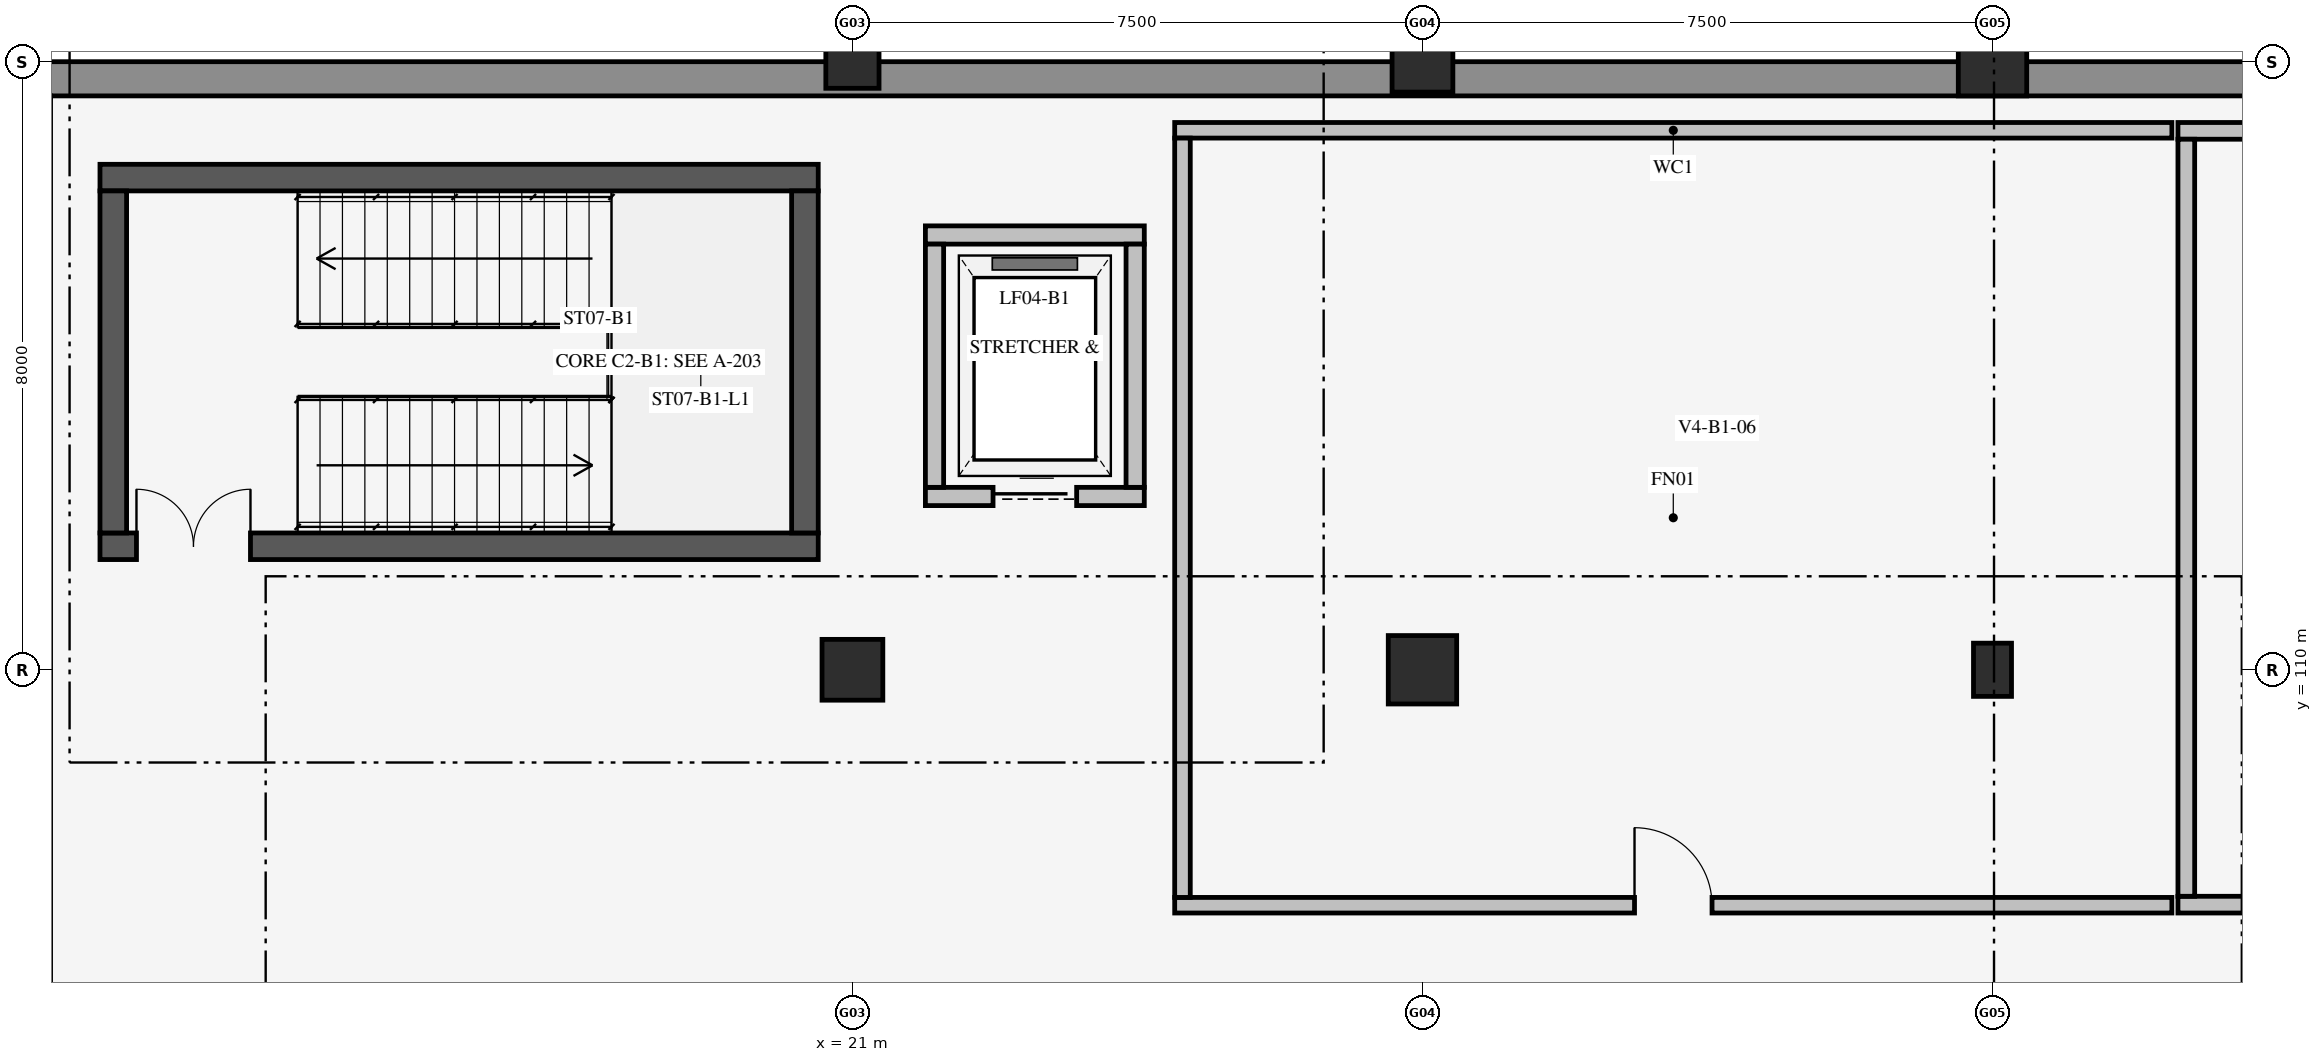
"""IFC4 building model, lengths in metres.
Left out: names, types, materials, properties, quantities, classifications, styles, units other than length and angle.
Written with IfcOpenShell. Run it as: python <this file> out.ifc"""

import sys

from ifc_helpers import new_model, si_unit, direction, frame, frame_2d, origin, origin_2d, place, context, subcontext, project, spatial, rectangle, extrude, element, fill, save


model = new_model("IFC4")
c1 = context("Model", 3, precision=1e-05, world=origin(), true_north=direction((0.0, 1.0)))
c2 = subcontext(c1, "Body", "Model", "MODEL_VIEW")
j1 = project(units=[si_unit("LENGTHUNIT", "METRE"), si_unit("PLANEANGLEUNIT", "RADIAN")], contexts=[c1])
p1 = place(None, origin())
s1 = spatial("IfcSite", under=j1, at=p1, CompositionType="ELEMENT")
p2 = place(p1, origin())
s2 = spatial("IfcBuilding", under=s1, at=p2, CompositionType="ELEMENT")
p3 = place(p2, frame((0.0, 0.0, -5.2)))
s3 = spatial("IfcBuildingStorey", under=s2, at=p3, CompositionType="ELEMENT", Elevation=-5.2)
p4 = place(p3, frame((10.0, 117.775, 0.0), z_axis=(0.0, 0.0, 1.0), x_axis=(1.0, 0.0, 0.0)))
e1 = element("IfcWall", 1, at=p4, inside=s3, PredefinedType="USERDEFINED", context=c2, shape_type="SweptSolid", body=[
    extrude(rectangle(XDim=79.0, YDim=0.45, at=frame_2d((39.5, 0.0))), origin(), (0.0, 0.0, 1.0), 4.94),
])
p5 = place(p3, frame((11.1, 111.625, 0.0), z_axis=(0.0, 0.0, 1.0), x_axis=(1.0, 0.0, 0.0)))
e2 = element("IfcWall", 2, at=p5, inside=s3, PredefinedType="SHEAR", context=c2, shape_type="SweptSolid", body=[
    extrude(rectangle(XDim=9.45, YDim=0.35, at=frame_2d((4.725, 0.0))), origin(), (0.0, 0.0, 1.0), 4.94),
])
p6 = place(p5, frame((0.48, 0.0, 0.0)))
e3 = element("IfcOpeningElement", 3, at=p6, cuts=e2, PredefinedType="OPENING", context=c2, shape_type="SweptSolid", body=[
    extrude(rectangle(XDim=1.5, YDim=2.3, at=frame_2d((0.75, 1.15))), frame((0.0, 0.187, 0.0), z_axis=(0.0, -1.0, 0.0), x_axis=(1.0, 0.0, 0.0)), (0.0, 0.0, 1.0), 0.374),
])
p7 = place(p3, frame((11.1, 116.475, 0.0), z_axis=(0.0, 0.0, 1.0), x_axis=(1.0, 0.0, 0.0)))
e4 = element("IfcWall", 4, at=p7, inside=s3, PredefinedType="SHEAR", context=c2, shape_type="SweptSolid", body=[
    extrude(rectangle(XDim=9.45, YDim=0.35, at=frame_2d((4.725, 0.0))), origin(), (0.0, 0.0, 1.0), 4.94),
])
for number, where, z_axis, x_axis in (
    (5, (11.275, 111.8, 0.0), (0.0, 0.0, 1.0), (0.0, 1.0, 0.0)),
    (6, (20.375, 111.8, 0.0), (0.0, 0.0, 1.0), (0.0, 1.0, 0.0)),
):
    element("IfcWall", number, at=place(p3, frame(where, z_axis=z_axis, x_axis=x_axis)), inside=s3, PredefinedType="SHEAR", context=c2, shape_type="SweptSolid", body=[
        extrude(rectangle(XDim=4.5, YDim=0.35, at=frame_2d((2.25, 0.0))), origin(), (0.0, 0.0, 1.0), 4.94),
    ])
p8 = place(p3, frame((21.96, 112.28, 0.0), z_axis=(0.0, 0.0, 1.0), x_axis=(1.0, 0.0, 0.0)))
e7 = element("IfcWall", 7, at=p8, inside=s3, PredefinedType="SOLIDWALL", context=c2, shape_type="SweptSolid", body=[
    extrude(rectangle(XDim=2.88, YDim=0.24, at=frame_2d((1.44, 0.0))), origin(), (0.0, 0.0, 1.0), 5.2),
])
p9 = place(p8, frame((0.89, 0.0, 0.0)))
e8 = element("IfcOpeningElement", 8, at=p9, cuts=e7, PredefinedType="OPENING", context=c2, shape_type="SweptSolid", body=[
    extrude(rectangle(XDim=1.1, YDim=2.15, at=frame_2d((0.55, 1.075))), frame((0.0, 0.132, 0.0), z_axis=(0.0, -1.0, 0.0), x_axis=(1.0, 0.0, 0.0)), (0.0, 0.0, 1.0), 0.264),
])
p10 = place(p3, frame((21.96, 115.72, 0.0), z_axis=(0.0, 0.0, 1.0), x_axis=(1.0, 0.0, 0.0)))
e9 = element("IfcWall", 9, at=p10, inside=s3, PredefinedType="SOLIDWALL", context=c2, shape_type="SweptSolid", body=[
    extrude(rectangle(XDim=2.88, YDim=0.24, at=frame_2d((1.44, 0.0))), origin(), (0.0, 0.0, 1.0), 5.2),
])
for number, where, z_axis, x_axis in (
    (10, (22.08, 112.4, 0.0), (0.0, 0.0, 1.0), (0.0, 1.0, 0.0)),
    (11, (24.72, 112.4, 0.0), (0.0, 0.0, 1.0), (0.0, 1.0, 0.0)),
):
    element("IfcWall", number, at=place(p3, frame(where, z_axis=z_axis, x_axis=x_axis)), inside=s3, PredefinedType="SOLIDWALL", context=c2, shape_type="SweptSolid", body=[
        extrude(rectangle(XDim=3.2, YDim=0.24, at=frame_2d((1.6, 0.0))), origin(), (0.0, 0.0, 1.0), 5.2),
    ])
p11 = place(p3, frame((21.0, 110.0, 0.0), z_axis=(0.0, 0.0, 1.0), x_axis=(1.0, 0.0, 0.0)))
e12 = element("IfcColumn", 12, at=p11, inside=s3, PredefinedType="COLUMN", context=c2, shape_type="SweptSolid", body=[
    extrude(rectangle(XDim=0.8, YDim=0.8, at=origin_2d()), origin(), (0.0, 0.0, 1.0), 5.2),
])
p12 = place(p3, frame((21.0, 118.0, 0.0), z_axis=(0.0, 0.0, 1.0), x_axis=(1.0, 0.0, 0.0)))
e13 = element("IfcColumn", 13, at=p12, inside=s3, PredefinedType="COLUMN", context=c2, shape_type="SweptSolid", body=[
    extrude(rectangle(XDim=0.7, YDim=0.7, at=origin_2d()), origin(), (0.0, 0.0, 1.0), 5.2),
])
p13 = place(p3, frame((28.5, 110.0, 0.0), z_axis=(0.0, 0.0, 1.0), x_axis=(1.0, 0.0, 0.0)))
e14 = element("IfcColumn", 14, at=p13, inside=s3, PredefinedType="COLUMN", context=c2, shape_type="SweptSolid", body=[
    extrude(rectangle(XDim=0.9, YDim=0.9, at=origin_2d()), origin(), (0.0, 0.0, 1.0), 5.2),
])
p14 = place(p3, frame((28.5, 118.0, 0.0), z_axis=(0.0, 0.0, 1.0), x_axis=(1.0, 0.0, 0.0)))
e15 = element("IfcColumn", 15, at=p14, inside=s3, PredefinedType="COLUMN", context=c2, shape_type="SweptSolid", body=[
    extrude(rectangle(XDim=0.8, YDim=0.8, at=origin_2d()), origin(), (0.0, 0.0, 1.0), 5.2),
])
p15 = place(p3, frame((36.0, 110.0, 0.0), z_axis=(0.0, 0.0, 1.0), x_axis=(1.0, 0.0, 0.0)))
e16 = element("IfcColumn", 16, at=p15, inside=s3, PredefinedType="COLUMN", context=c2, shape_type="SweptSolid", body=[
    extrude(rectangle(XDim=0.5, YDim=0.7, at=origin_2d()), origin(), (0.0, 0.0, 1.0), 5.2),
])
p16 = place(p3, frame((36.0, 118.0, 0.0), z_axis=(0.0, 0.0, 1.0), x_axis=(1.0, 0.0, 0.0)))
e17 = element("IfcColumn", 17, at=p16, inside=s3, PredefinedType="COLUMN", context=c2, shape_type="SweptSolid", body=[
    extrude(rectangle(XDim=0.9, YDim=0.9, at=origin_2d()), origin(), (0.0, 0.0, 1.0), 5.2),
])
p17 = place(p3, frame((25.24, 106.903, 0.0), z_axis=(0.0, 0.0, 1.0), x_axis=(1.0, 0.0, 0.0)))
e18 = element("IfcWall", 18, at=p17, inside=s3, PredefinedType="SOLIDWALL", context=c2, shape_type="SweptSolid", body=[
    extrude(rectangle(XDim=13.12, YDim=0.205, at=frame_2d((6.56, 0.0))), origin(), (0.0, 0.0, 1.0), 4.925),
])
p18 = place(p17, frame((6.05, 0.0, 0.0)))
e19 = element("IfcOpeningElement", 19, at=p18, cuts=e18, PredefinedType="OPENING", context=c2, shape_type="SweptSolid", body=[
    extrude(rectangle(XDim=1.02, YDim=2.2, at=frame_2d((0.51, 1.1))), frame((0.0, 0.115, 0.0), z_axis=(0.0, -1.0, 0.0), x_axis=(1.0, 0.0, 0.0)), (0.0, 0.0, 1.0), 0.229),
])
p19 = place(p3, frame((25.24, 117.097, 0.0), z_axis=(0.0, 0.0, 1.0), x_axis=(1.0, 0.0, 0.0)))
e20 = element("IfcWall", 20, at=p19, inside=s3, PredefinedType="SOLIDWALL", context=c2, shape_type="SweptSolid", body=[
    extrude(rectangle(XDim=13.12, YDim=0.205, at=frame_2d((6.56, 0.0))), origin(), (0.0, 0.0, 1.0), 4.925),
])
p20 = place(p3, frame((25.343, 107.005, 0.0), z_axis=(0.0, 0.0, 1.0), x_axis=(0.0, 1.0, 0.0)))
e21 = element("IfcWall", 21, at=p20, inside=s3, PredefinedType="SOLIDWALL", context=c2, shape_type="SweptSolid", body=[
    extrude(rectangle(XDim=9.99, YDim=0.205, at=frame_2d((4.995, 0.0))), origin(), (0.0, 0.0, 1.0), 4.925),
])
p21 = place(p3, frame((38.44, 106.91, 0.0), z_axis=(0.0, 0.0, 1.0), x_axis=(1.0, 0.0, 0.0)))
e22 = element("IfcWall", 22, at=p21, inside=s3, PredefinedType="PLUMBINGWALL", context=c2, shape_type="SweptSolid", body=[
    extrude(rectangle(XDim=13.12, YDim=0.22, at=frame_2d((6.56, 0.0))), origin(), (0.0, 0.0, 1.0), 4.925),
])
p22 = place(p21, frame((3.292, 0.0, 0.0)))
e23 = element("IfcOpeningElement", 23, at=p22, cuts=e22, PredefinedType="OPENING", context=c2, shape_type="SweptSolid", body=[
    extrude(rectangle(XDim=1.05, YDim=2.15, at=frame_2d((0.525, 1.075))), frame((0.0, 0.122, 0.0), z_axis=(0.0, -1.0, 0.0), x_axis=(1.0, 0.0, 0.0)), (0.0, 0.0, 1.0), 0.244),
])
p23 = place(p3, frame((38.44, 117.09, 0.0), z_axis=(0.0, 0.0, 1.0), x_axis=(1.0, 0.0, 0.0)))
e24 = element("IfcWall", 24, at=p23, inside=s3, PredefinedType="PLUMBINGWALL", context=c2, shape_type="SweptSolid", body=[
    extrude(rectangle(XDim=13.12, YDim=0.22, at=frame_2d((6.56, 0.0))), origin(), (0.0, 0.0, 1.0), 4.925),
])
p24 = place(p3, frame((38.55, 107.02, 0.0), z_axis=(0.0, 0.0, 1.0), x_axis=(0.0, 1.0, 0.0)))
e25 = element("IfcWall", 25, at=p24, inside=s3, PredefinedType="PLUMBINGWALL", context=c2, shape_type="SweptSolid", body=[
    extrude(rectangle(XDim=9.96, YDim=0.22, at=frame_2d((4.98, 0.0))), origin(), (0.0, 0.0, 1.0), 4.925),
])
p25 = place(p6, origin())
e26 = element("IfcDoor", 26, at=p25, inside=s3, OperationType="DOUBLE_DOOR_SINGLE_SWING", PredefinedType="DOOR", context=c2, shape_type="SweptSolid", body=[
    extrude(rectangle(XDim=1.5, YDim=2.3, at=frame_2d((0.75, 1.15))), frame((0.0, 0.025, 0.0), z_axis=(0.0, -1.0, 0.0), x_axis=(1.0, 0.0, 0.0)), (0.0, 0.0, 1.0), 0.05),
])
fill(e3, e26)
p26 = place(p18, origin())
e27 = element("IfcDoor", 27, at=p26, inside=s3, OperationType="SINGLE_SWING_LEFT", PredefinedType="DOOR", context=c2, shape_type="SweptSolid", body=[
    extrude(rectangle(XDim=1.02, YDim=2.2, at=frame_2d((0.51, 1.1))), frame((0.0, 0.025, 0.0), z_axis=(0.0, -1.0, 0.0), x_axis=(1.0, 0.0, 0.0)), (0.0, 0.0, 1.0), 0.05),
])
fill(e19, e27)
p27 = place(p9, origin())
e28 = element("IfcDoor", 28, at=p27, inside=s3, OperationType="SLIDING_TO_LEFT", PredefinedType="USERDEFINED", context=c2, shape_type="SweptSolid", body=[
    extrude(rectangle(XDim=1.1, YDim=2.15, at=frame_2d((0.55, 1.075))), frame((0.0, 0.025, 0.0), z_axis=(0.0, -1.0, 0.0), x_axis=(1.0, 0.0, 0.0)), (0.0, 0.0, 1.0), 0.05),
])
fill(e8, e28)
save(model, sys.argv[1])
